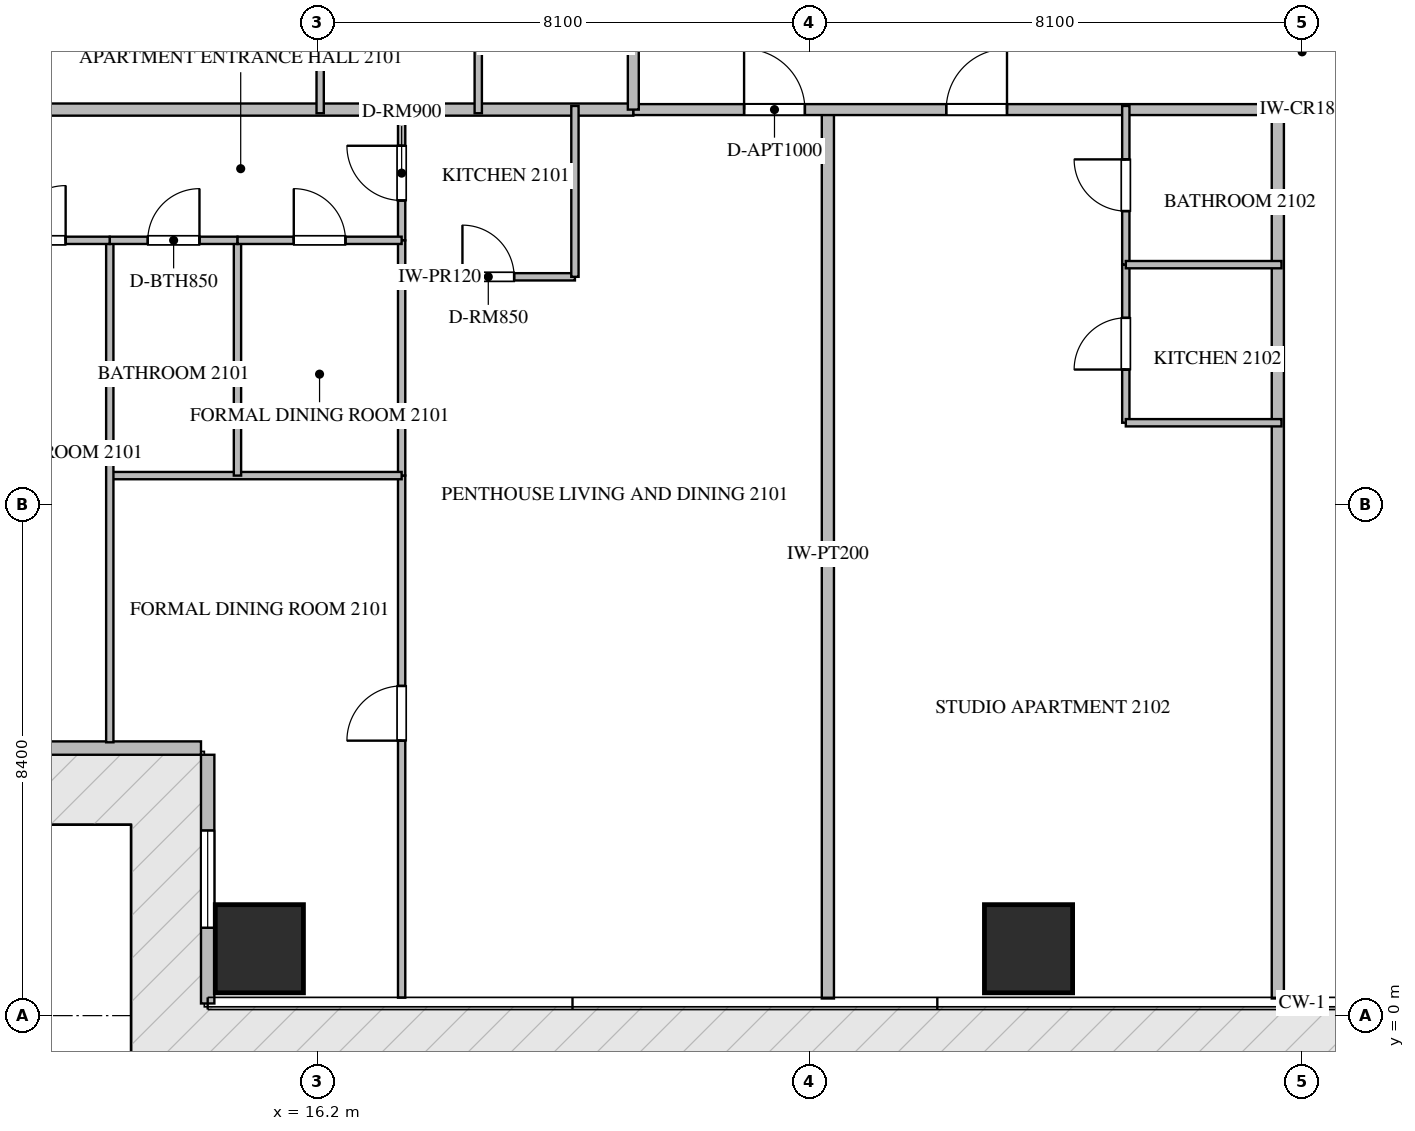
"""IFC4 building model, lengths in metres.
Left out: names, types, materials, properties, quantities, classifications, styles, units other than length and angle.
Written with IfcOpenShell. Run it as: python <this file> out.ifc"""

import sys

from ifc_helpers import new_model, si_unit, direction, frame, frame_2d, origin, origin_2d, place, context, subcontext, project, spatial, rectangle, extrude, source, transform, mapped, element, fill, save


model = new_model("IFC4")
c1 = context("Model", 3, precision=1e-05, world=origin(), true_north=direction((0.0, 1.0)))
c2 = subcontext(c1, "Body", "Model", "MODEL_VIEW")
j1 = project(units=[si_unit("LENGTHUNIT", "METRE"), si_unit("PLANEANGLEUNIT", "RADIAN")], contexts=[c1])
p1 = place(None, origin())
s1 = spatial("IfcSite", under=j1, at=p1, CompositionType="ELEMENT")
p2 = place(p1, origin())
s2 = spatial("IfcBuilding", under=s1, at=p2, CompositionType="ELEMENT")
p3 = place(p2, frame((0.0, 0.0, 86.7)))
s3 = spatial("IfcBuildingStorey", under=s2, at=p3, CompositionType="ELEMENT", Elevation=86.7)
m1 = source(origin(), c2, "Body", "SweptSolid", [
    extrude(rectangle(XDim=1.45, YDim=1.45, at=origin_2d()), origin(), (0.0, 0.0, 1.0), 3.75),
])
for number, where, z_axis, x_axis in (
    (1, (15.25, 1.1, -0.26), (0.0, 0.0, 1.0), (1.0, 0.0, 0.0)),
    (2, (27.9, 1.1, -0.26), (0.0, 0.0, 1.0), (1.0, 0.0, 0.0)),
):
    element("IfcColumn", number, at=place(p3, frame(where, z_axis=z_axis, x_axis=x_axis)), inside=s3, PredefinedType="COLUMN", context=c2, shape_type="MappedRepresentation", body=[
        mapped(m1, transform((0.0, 0.0, 0.0), scale=1.0)),
    ])
p4 = place(p3, frame((10.31, 4.4, 0.0), z_axis=(0.0, 0.0, 1.0), x_axis=(1.0, 0.0, 0.0)))
e3 = element("IfcWall", 3, at=p4, inside=s3, PredefinedType="ELEMENTEDWALL", context=c2, shape_type="SweptSolid", body=[
    extrude(rectangle(XDim=3.98, YDim=0.22, at=frame_2d((1.99, 0.0))), origin(), (0.0, 0.0, 1.0), 3.475),
])
p5 = place(p3, frame((14.4, 4.29, 0.0), z_axis=(0.0, 0.0, 1.0), x_axis=(0.0, -1.0, 0.0)))
e4 = element("IfcWall", 4, at=p5, inside=s3, PredefinedType="ELEMENTEDWALL", context=c2, shape_type="SweptSolid", body=[
    extrude(rectangle(XDim=4.09, YDim=0.22, at=frame_2d((2.045, 0.0))), origin(), (0.0, 0.0, 1.0), 3.475),
])
p6 = place(p5, frame((1.245, 0.0, 0.65)))
e5 = element("IfcOpeningElement", 5, at=p6, cuts=e4, PredefinedType="OPENING", context=c2, shape_type="SweptSolid", body=[
    extrude(rectangle(XDim=1.6, YDim=2.1, at=frame_2d((0.8, 1.05))), frame((0.0, 0.12, 0.0), z_axis=(0.0, -1.0, 0.0), x_axis=(1.0, 0.0, 0.0)), (0.0, 0.0, 1.0), 0.24),
])
for number, where, z_axis, x_axis in (
    (6, (24.6, 0.282, 0.0), (0.0, 0.0, 1.0), (0.0, 1.0, 0.0)),
    (7, (32.0, 0.282, 0.0), (0.0, 0.0, 1.0), (0.0, 1.0, 0.0)),
):
    element("IfcWall", number, at=place(p3, frame(where, z_axis=z_axis, x_axis=x_axis)), inside=s3, PredefinedType="PARTITIONING", context=c2, shape_type="SweptSolid", body=[
        extrude(rectangle(XDim=14.618, YDim=0.2, at=frame_2d((7.309, 0.0))), origin(), (0.0, 0.0, 1.0), 3.49),
    ])
p7 = place(p3, frame((6.082, 14.9, 0.0), z_axis=(0.0, 0.0, 1.0), x_axis=(1.0, 0.0, 0.0)))
e8 = element("IfcWall", 8, at=p7, inside=s3, PredefinedType="PARTITIONING", context=c2, shape_type="SweptSolid", body=[
    extrude(rectangle(XDim=15.318, YDim=0.2, at=frame_2d((7.659, 0.0))), origin(), (0.0, 0.0, 1.0), 3.49),
])
p8 = place(p3, frame((21.402, 14.9, 0.0), z_axis=(0.0, 0.0, 1.0), x_axis=(1.0, 0.0, 0.0)))
e9 = element("IfcWall", 9, at=p8, inside=s3, PredefinedType="PARTITIONING", context=c2, shape_type="SweptSolid", body=[
    extrude(rectangle(XDim=21.996, YDim=0.18, at=frame_2d((10.998, 0.0))), origin(), (0.0, 0.0, 1.0), 3.49),
])
p9 = place(p8, frame((1.82, 0.0, 0.0)))
e10 = element("IfcOpeningElement", 10, at=p9, cuts=e9, PredefinedType="OPENING", context=c2, shape_type="SweptSolid", body=[
    extrude(rectangle(XDim=1.0, YDim=2.15, at=frame_2d((0.5, 1.075))), frame((0.0, 0.1, 0.0), z_axis=(0.0, -1.0, 0.0), x_axis=(1.0, 0.0, 0.0)), (0.0, 0.0, 1.0), 0.2),
])
p10 = place(p8, frame((5.144, 0.0, 0.0)))
e11 = element("IfcOpeningElement", 11, at=p10, cuts=e9, PredefinedType="OPENING", context=c2, shape_type="SweptSolid", body=[
    extrude(rectangle(XDim=1.0, YDim=2.15, at=frame_2d((0.5, 1.075))), frame((0.0, 0.1, 0.0), z_axis=(0.0, -1.0, 0.0), x_axis=(1.0, 0.0, 0.0)), (0.0, 0.0, 1.0), 0.2),
])
p11 = place(p8, frame((11.758, 0.0, 0.0)))
e12 = element("IfcOpeningElement", 12, at=p11, cuts=e9, PredefinedType="OPENING", context=c2, shape_type="SweptSolid", body=[
    extrude(rectangle(XDim=1.0, YDim=2.15, at=frame_2d((0.5, 1.075))), frame((0.0, 0.1, 0.0), z_axis=(0.0, -1.0, 0.0), x_axis=(1.0, 0.0, 0.0)), (0.0, 0.0, 1.0), 0.2),
])
p12 = place(p8, frame((18.896, 0.0, 0.0)))
e13 = element("IfcOpeningElement", 13, at=p12, cuts=e9, PredefinedType="OPENING", context=c2, shape_type="SweptSolid", body=[
    extrude(rectangle(XDim=1.0, YDim=2.15, at=frame_2d((0.5, 1.075))), frame((0.0, 0.1, 0.0), z_axis=(0.0, -1.0, 0.0), x_axis=(1.0, 0.0, 0.0)), (0.0, 0.0, 1.0), 0.2),
])
p13 = place(p3, frame((21.4, 14.9, 0.0), z_axis=(0.0, 0.0, 1.0), x_axis=(0.0, 1.0, 0.0)))
e14 = element("IfcWall", 14, at=p13, inside=s3, PredefinedType="PARTITIONING", context=c2, shape_type="SweptSolid", body=[
    extrude(rectangle(XDim=20.6, YDim=0.18, at=frame_2d((10.3, 0.0))), origin(), (0.0, 0.0, 1.0), 3.49),
])
p14 = place(p13, frame((5.625, 0.0, 0.0)))
e15 = element("IfcOpeningElement", 15, at=p14, cuts=e14, PredefinedType="OPENING", context=c2, shape_type="SweptSolid", body=[
    extrude(rectangle(XDim=1.0, YDim=2.15, at=frame_2d((0.5, 1.075))), frame((0.0, 0.1, 0.0), z_axis=(0.0, -1.0, 0.0), x_axis=(1.0, 0.0, 0.0)), (0.0, 0.0, 1.0), 0.2),
])
p15 = place(p13, frame((17.64, 0.0, 0.0)))
e16 = element("IfcOpeningElement", 16, at=p15, cuts=e14, PredefinedType="OPENING", context=c2, shape_type="SweptSolid", body=[
    extrude(rectangle(XDim=1.0, YDim=2.15, at=frame_2d((0.5, 1.075))), frame((0.0, 0.1, 0.0), z_axis=(0.0, -1.0, 0.0), x_axis=(1.0, 0.0, 0.0)), (0.0, 0.0, 1.0), 0.2),
])
p16 = place(p3, frame((17.59, 12.15, 0.0), z_axis=(0.0, 0.0, 1.0), x_axis=(1.0, 0.0, 0.0)))
e17 = element("IfcWall", 17, at=p16, inside=s3, PredefinedType="PARTITIONING", context=c2, shape_type="SweptSolid", body=[
    extrude(rectangle(XDim=2.85, YDim=0.12, at=frame_2d((1.425, 0.0))), origin(), (0.0, 0.0, 1.0), 3.49),
])
p17 = place(p16, frame((1.0, 0.0, 0.0)))
e18 = element("IfcOpeningElement", 18, at=p17, cuts=e17, PredefinedType="OPENING", context=c2, shape_type="SweptSolid", body=[
    extrude(rectangle(XDim=0.85, YDim=2.1, at=frame_2d((0.425, 1.05))), frame((0.0, 0.07, 0.0), z_axis=(0.0, -1.0, 0.0), x_axis=(1.0, 0.0, 0.0)), (0.0, 0.0, 1.0), 0.14),
])
p18 = place(p3, frame((20.44, 12.15, 0.0), z_axis=(0.0, 0.0, 1.0), x_axis=(0.0, 1.0, 0.0)))
e19 = element("IfcWall", 19, at=p18, inside=s3, PredefinedType="PARTITIONING", context=c2, shape_type="SweptSolid", body=[
    extrude(rectangle(XDim=2.81, YDim=0.12, at=frame_2d((1.405, 0.0))), origin(), (0.0, 0.0, 1.0), 3.49),
])
p19 = place(p3, frame((17.59, 12.75, 0.0), z_axis=(0.0, 0.0, 1.0), x_axis=(0.0, 1.0, 0.0)))
e20 = element("IfcWall", 20, at=p19, inside=s3, PredefinedType="PARTITIONING", context=c2, shape_type="SweptSolid", body=[
    extrude(rectangle(XDim=2.21, YDim=0.12, at=frame_2d((1.105, 0.0))), origin(), (0.0, 0.0, 1.0), 3.49),
])
p20 = place(p19, frame((0.655, 0.0, 0.0)))
e21 = element("IfcOpeningElement", 21, at=p20, cuts=e20, PredefinedType="OPENING", context=c2, shape_type="SweptSolid", body=[
    extrude(rectangle(XDim=0.9, YDim=2.1, at=frame_2d((0.45, 1.05))), frame((0.0, 0.07, 0.0), z_axis=(0.0, -1.0, 0.0), x_axis=(1.0, 0.0, 0.0)), (0.0, 0.0, 1.0), 0.14),
])
p21 = place(p3, frame((17.59, 0.295, 0.0), z_axis=(0.0, 0.0, 1.0), x_axis=(0.0, 1.0, 0.0)))
e22 = element("IfcWall", 22, at=p21, inside=s3, PredefinedType="PARTITIONING", context=c2, shape_type="SweptSolid", body=[
    extrude(rectangle(XDim=8.586, YDim=0.12, at=frame_2d((4.293, 0.0))), origin(), (0.0, 0.0, 1.0), 3.49),
])
p22 = place(p21, frame((4.227, 0.0, 0.0)))
e23 = element("IfcOpeningElement", 23, at=p22, cuts=e22, PredefinedType="OPENING", context=c2, shape_type="SweptSolid", body=[
    extrude(rectangle(XDim=0.9, YDim=2.1, at=frame_2d((0.45, 1.05))), frame((0.0, 0.07, 0.0), z_axis=(0.0, -1.0, 0.0), x_axis=(1.0, 0.0, 0.0)), (0.0, 0.0, 1.0), 0.14),
])
p23 = place(p3, frame((17.59, 8.883, 0.0), z_axis=(0.0, 0.0, 1.0), x_axis=(0.0, 1.0, 0.0)))
e24 = element("IfcWall", 24, at=p23, inside=s3, PredefinedType="PARTITIONING", context=c2, shape_type="SweptSolid", body=[
    extrude(rectangle(XDim=3.865, YDim=0.12, at=frame_2d((1.933, 0.0))), origin(), (0.0, 0.0, 1.0), 3.49),
])
p24 = place(p3, frame((12.79, 8.881, 0.0), z_axis=(0.0, 0.0, 1.0), x_axis=(1.0, 0.0, 0.0)))
e25 = element("IfcWall", 25, at=p24, inside=s3, PredefinedType="PARTITIONING", context=c2, shape_type="SweptSolid", body=[
    extrude(rectangle(XDim=4.8, YDim=0.12, at=frame_2d((2.4, 0.0))), origin(), (0.0, 0.0, 1.0), 3.49),
])
p25 = place(p3, frame((12.79, 4.495, 0.0), z_axis=(0.0, 0.0, 1.0), x_axis=(0.0, 1.0, 0.0)))
e26 = element("IfcWall", 26, at=p25, inside=s3, PredefinedType="PARTITIONING", context=c2, shape_type="SweptSolid", body=[
    extrude(rectangle(XDim=8.255, YDim=0.12, at=frame_2d((4.127, 0.0))), origin(), (0.0, 0.0, 1.0), 3.49),
])
p26 = place(p3, frame((14.89, 8.881, 0.0), z_axis=(0.0, 0.0, 1.0), x_axis=(0.0, 1.0, 0.0)))
e27 = element("IfcWall", 27, at=p26, inside=s3, PredefinedType="PARTITIONING", context=c2, shape_type="SweptSolid", body=[
    extrude(rectangle(XDim=3.869, YDim=0.12, at=frame_2d((1.935, 0.0))), origin(), (0.0, 0.0, 1.0), 3.49),
])
p27 = place(p3, frame((12.79, 12.75, 0.0), z_axis=(0.0, 0.0, 1.0), x_axis=(1.0, 0.0, 0.0)))
e28 = element("IfcWall", 28, at=p27, inside=s3, PredefinedType="PARTITIONING", context=c2, shape_type="SweptSolid", body=[
    extrude(rectangle(XDim=2.1, YDim=0.12, at=frame_2d((1.05, 0.0))), origin(), (0.0, 0.0, 1.0), 3.49),
])
p28 = place(p27, frame((0.625, 0.0, 0.0)))
e29 = element("IfcOpeningElement", 29, at=p28, cuts=e28, PredefinedType="OPENING", context=c2, shape_type="SweptSolid", body=[
    extrude(rectangle(XDim=0.85, YDim=2.1, at=frame_2d((0.425, 1.05))), frame((0.0, 0.07, 0.0), z_axis=(0.0, -1.0, 0.0), x_axis=(1.0, 0.0, 0.0)), (0.0, 0.0, 1.0), 0.14),
])
p29 = place(p3, frame((14.892, 12.75, 0.0), z_axis=(0.0, 0.0, 1.0), x_axis=(1.0, 0.0, 0.0)))
e30 = element("IfcWall", 30, at=p29, inside=s3, PredefinedType="PARTITIONING", context=c2, shape_type="SweptSolid", body=[
    extrude(rectangle(XDim=2.698, YDim=0.12, at=frame_2d((1.349, 0.0))), origin(), (0.0, 0.0, 1.0), 3.49),
])
p30 = place(p29, frame((0.924, 0.0, 0.0)))
e31 = element("IfcOpeningElement", 31, at=p30, cuts=e30, PredefinedType="OPENING", context=c2, shape_type="SweptSolid", body=[
    extrude(rectangle(XDim=0.85, YDim=2.1, at=frame_2d((0.425, 1.05))), frame((0.0, 0.07, 0.0), z_axis=(0.0, -1.0, 0.0), x_axis=(1.0, 0.0, 0.0)), (0.0, 0.0, 1.0), 0.14),
])
p31 = place(p3, frame((10.44, 12.75, 0.0), z_axis=(0.0, 0.0, 1.0), x_axis=(1.0, 0.0, 0.0)))
e32 = element("IfcWall", 32, at=p31, inside=s3, PredefinedType="PARTITIONING", context=c2, shape_type="SweptSolid", body=[
    extrude(rectangle(XDim=2.348, YDim=0.12, at=frame_2d((1.174, 0.0))), origin(), (0.0, 0.0, 1.0), 3.49),
])
p32 = place(p31, frame((0.724, 0.0, 0.0)))
e33 = element("IfcOpeningElement", 33, at=p32, cuts=e32, PredefinedType="OPENING", context=c2, shape_type="SweptSolid", body=[
    extrude(rectangle(XDim=0.9, YDim=2.1, at=frame_2d((0.45, 1.05))), frame((0.0, 0.07, 0.0), z_axis=(0.0, -1.0, 0.0), x_axis=(1.0, 0.0, 0.0)), (0.0, 0.0, 1.0), 0.14),
])
p33 = place(p3, frame((29.5, 9.75, 0.0), z_axis=(0.0, 0.0, 1.0), x_axis=(0.0, 1.0, 0.0)))
e34 = element("IfcWall", 34, at=p33, inside=s3, PredefinedType="PARTITIONING", context=c2, shape_type="SweptSolid", body=[
    extrude(rectangle(XDim=2.6, YDim=0.12, at=frame_2d((1.3, 0.0))), origin(), (0.0, 0.0, 1.0), 3.49),
])
p34 = place(p33, frame((0.875, 0.0, 0.0)))
e35 = element("IfcOpeningElement", 35, at=p34, cuts=e34, PredefinedType="OPENING", context=c2, shape_type="SweptSolid", body=[
    extrude(rectangle(XDim=0.85, YDim=2.1, at=frame_2d((0.425, 1.05))), frame((0.0, 0.07, 0.0), z_axis=(0.0, -1.0, 0.0), x_axis=(1.0, 0.0, 0.0)), (0.0, 0.0, 1.0), 0.14),
])
p35 = place(p3, frame((29.5, 12.352, 0.0), z_axis=(0.0, 0.0, 1.0), x_axis=(0.0, 1.0, 0.0)))
e36 = element("IfcWall", 36, at=p35, inside=s3, PredefinedType="PARTITIONING", context=c2, shape_type="SweptSolid", body=[
    extrude(rectangle(XDim=2.608, YDim=0.12, at=frame_2d((1.304, 0.0))), origin(), (0.0, 0.0, 1.0), 3.49),
])
p36 = place(p35, frame((0.879, 0.0, 0.0)))
e37 = element("IfcOpeningElement", 37, at=p36, cuts=e36, PredefinedType="OPENING", context=c2, shape_type="SweptSolid", body=[
    extrude(rectangle(XDim=0.85, YDim=2.1, at=frame_2d((0.425, 1.05))), frame((0.0, 0.07, 0.0), z_axis=(0.0, -1.0, 0.0), x_axis=(1.0, 0.0, 0.0)), (0.0, 0.0, 1.0), 0.14),
])
for number, where, z_axis, x_axis in (
    (38, (29.5, 12.35, 0.0), (0.0, 0.0, 1.0), (1.0, 0.0, 0.0)),
    (39, (29.5, 9.75, 0.0), (0.0, 0.0, 1.0), (1.0, 0.0, 0.0)),
):
    element("IfcWall", number, at=place(p3, frame(where, z_axis=z_axis, x_axis=x_axis)), inside=s3, PredefinedType="PARTITIONING", context=c2, shape_type="SweptSolid", body=[
        extrude(rectangle(XDim=2.56, YDim=0.12, at=frame_2d((1.28, 0.0))), origin(), (0.0, 0.0, 1.0), 3.49),
    ])
for number, where, z_axis, x_axis in (
    (40, (18.85, 14.84, 0.0), (0.0, 0.0, 1.0), (0.0, 1.0, 0.0)),
    (41, (16.25, 14.84, 0.0), (0.0, 0.0, 1.0), (0.0, 1.0, 0.0)),
):
    element("IfcWall", number, at=place(p3, frame(where, z_axis=z_axis, x_axis=x_axis)), inside=s3, PredefinedType="PARTITIONING", context=c2, shape_type="SweptSolid", body=[
        extrude(rectangle(XDim=2.81, YDim=0.12, at=frame_2d((1.405, 0.0))), origin(), (0.0, 0.0, 1.0), 3.49),
    ])
m2 = source(origin(), c2, "Body", "SweptSolid", [
    extrude(rectangle(XDim=1.6, YDim=2.1, at=frame_2d((0.8, 1.05))), frame((0.0, 0.03, 0.0), z_axis=(0.0, -1.0, 0.0), x_axis=(1.0, 0.0, 0.0)), (0.0, 0.0, 1.0), 0.06),
])
p37 = place(p6, origin())
e42 = element("IfcWindow", 42, at=p37, inside=s3, PartitioningType="SINGLE_PANEL", PredefinedType="WINDOW", context=c2, shape_type="MappedRepresentation", body=[
    mapped(m2, transform((0.0, 0.0, 0.0), scale=1.0)),
])
fill(e5, e42)
m3 = source(origin(), c2, "Body", "SweptSolid", [
    extrude(rectangle(XDim=1.0, YDim=2.15, at=frame_2d((0.5, 1.075))), frame((0.0, 0.025, 0.0), z_axis=(0.0, -1.0, 0.0), x_axis=(1.0, 0.0, 0.0)), (0.0, 0.0, 1.0), 0.05),
])
p38 = place(p9, origin())
e43 = element("IfcDoor", 43, at=p38, inside=s3, OperationType="SINGLE_SWING_LEFT", PredefinedType="DOOR", context=c2, shape_type="MappedRepresentation", body=[
    mapped(m3, transform((0.0, 0.0, 0.0), scale=1.0)),
])
fill(e10, e43)
p39 = place(p10, origin())
e44 = element("IfcDoor", 44, at=p39, inside=s3, OperationType="SINGLE_SWING_RIGHT", PredefinedType="DOOR", context=c2, shape_type="MappedRepresentation", body=[
    mapped(m3, transform((0.0, 0.0, 0.0), scale=1.0)),
])
fill(e11, e44)
m4 = source(origin(), c2, "Body", "SweptSolid", [
    extrude(rectangle(XDim=0.85, YDim=2.1, at=frame_2d((0.425, 1.05))), frame((0.0, 0.025, 0.0), z_axis=(0.0, -1.0, 0.0), x_axis=(1.0, 0.0, 0.0)), (0.0, 0.0, 1.0), 0.05),
])
p40 = place(p17, origin())
e45 = element("IfcDoor", 45, at=p40, inside=s3, OperationType="SINGLE_SWING_LEFT", PredefinedType="DOOR", context=c2, shape_type="MappedRepresentation", body=[
    mapped(m4, transform((0.0, 0.0, 0.0), scale=1.0)),
])
fill(e18, e45)
m5 = source(origin(), c2, "Body", "SweptSolid", [
    extrude(rectangle(XDim=0.9, YDim=2.1, at=frame_2d((0.45, 1.05))), frame((0.0, 0.025, 0.0), z_axis=(0.0, -1.0, 0.0), x_axis=(1.0, 0.0, 0.0)), (0.0, 0.0, 1.0), 0.05),
])
p41 = place(p20, origin())
e46 = element("IfcDoor", 46, at=p41, inside=s3, OperationType="SINGLE_SWING_RIGHT", PredefinedType="DOOR", context=c2, shape_type="MappedRepresentation", body=[
    mapped(m5, transform((0.0, 0.0, 0.0), scale=1.0)),
])
fill(e21, e46)
p42 = place(p22, origin())
e47 = element("IfcDoor", 47, at=p42, inside=s3, OperationType="SINGLE_SWING_LEFT", PredefinedType="DOOR", context=c2, shape_type="MappedRepresentation", body=[
    mapped(m5, transform((0.0, 0.0, 0.0), scale=1.0)),
])
fill(e23, e47)
p43 = place(p28, origin())
e48 = element("IfcDoor", 48, at=p43, inside=s3, OperationType="SINGLE_SWING_RIGHT", PredefinedType="DOOR", context=c2, shape_type="MappedRepresentation", body=[
    mapped(m4, transform((0.0, 0.0, 0.0), scale=1.0)),
])
fill(e29, e48)
p44 = place(p30, origin())
e49 = element("IfcDoor", 49, at=p44, inside=s3, OperationType="SINGLE_SWING_LEFT", PredefinedType="DOOR", context=c2, shape_type="MappedRepresentation", body=[
    mapped(m4, transform((0.0, 0.0, 0.0), scale=1.0)),
])
fill(e31, e49)
p45 = place(p32, origin())
e50 = element("IfcDoor", 50, at=p45, inside=s3, OperationType="SINGLE_SWING_RIGHT", PredefinedType="DOOR", context=c2, shape_type="MappedRepresentation", body=[
    mapped(m5, transform((0.0, 0.0, 0.0), scale=1.0)),
])
fill(e33, e50)
p46 = place(p34, origin())
e51 = element("IfcDoor", 51, at=p46, inside=s3, OperationType="SINGLE_SWING_LEFT", PredefinedType="DOOR", context=c2, shape_type="MappedRepresentation", body=[
    mapped(m4, transform((0.0, 0.0, 0.0), scale=1.0)),
])
fill(e35, e51)
p47 = place(p36, origin())
e52 = element("IfcDoor", 52, at=p47, inside=s3, OperationType="SINGLE_SWING_RIGHT", PredefinedType="DOOR", context=c2, shape_type="MappedRepresentation", body=[
    mapped(m4, transform((0.0, 0.0, 0.0), scale=1.0)),
])
fill(e37, e52)
save(model, sys.argv[1])
